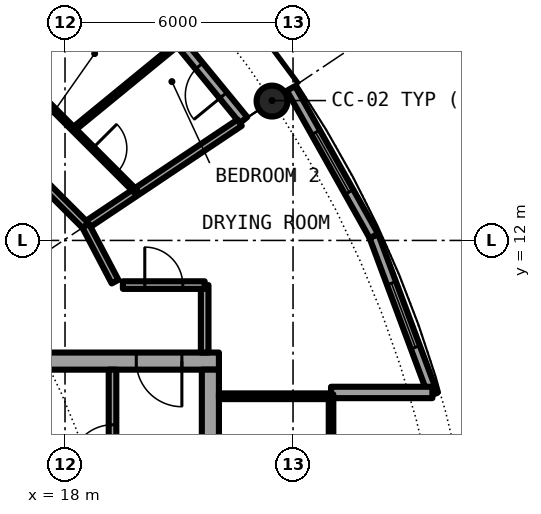
"""IFC4 building model, lengths in metres.
Left out: names, types, materials, properties, quantities, classifications, styles, units other than length and angle.
Written with IfcOpenShell. Run it as: python <this file> out.ifc"""

import sys

from ifc_helpers import new_model, si_unit, direction, frame, frame_2d, origin, origin_2d, place, context, subcontext, project, spatial, rectangle, hollow_circle, extrude, element, fill, save


model = new_model("IFC4")
c1 = context("Model", 3, precision=1e-05, world=origin(), true_north=direction((0.0, 1.0)))
c2 = subcontext(c1, "Body", "Model", "MODEL_VIEW")
j1 = project(units=[si_unit("LENGTHUNIT", "METRE"), si_unit("PLANEANGLEUNIT", "RADIAN")], contexts=[c1])
p1 = place(None, origin())
s1 = spatial("IfcSite", under=j1, at=p1, CompositionType="ELEMENT")
p2 = place(p1, origin())
s2 = spatial("IfcBuilding", under=s1, at=p2, CompositionType="ELEMENT")
p3 = place(p2, frame((0.0, 0.0, 218.8)))
s3 = spatial("IfcBuildingStorey", under=s2, at=p3, CompositionType="ELEMENT", Elevation=218.8)
p4 = place(p3, frame((23.448, 15.667, 0.0), z_axis=(0.0, 0.0, 1.0), x_axis=(1.0, 0.0, 0.0)))
e1 = element("IfcColumn", 1, at=p4, inside=s3, PredefinedType="COLUMN", context=c2, shape_type="SweptSolid", body=[
    extrude(hollow_circle(Radius=0.406, WallThickness=0.03, at=origin_2d()), origin(), (0.0, 0.0, 1.0), 3.05),
])
p5 = place(p3, frame((22.699, 15.167, 0.0), z_axis=(0.0, 0.0, 1.0), x_axis=(-0.634382322723, 0.773019449054, 0.0)))
e2 = element("IfcWall", 2, at=p5, inside=s3, PredefinedType="SOLIDWALL", context=c2, shape_type="SweptSolid", body=[
    extrude(rectangle(XDim=5.352, YDim=0.25, at=frame_2d((2.676, 0.0))), origin(), (0.0, 0.0, 1.0), 2.65),
])
p6 = place(p5, frame((0.841, 0.0, 0.0)))
e3 = element("IfcOpeningElement", 3, at=p6, cuts=e2, PredefinedType="OPENING", context=c2, shape_type="SweptSolid", body=[
    extrude(rectangle(XDim=1.0, YDim=2.2, at=frame_2d((0.5, 1.1))), frame((0.0, 0.135, 0.0), z_axis=(0.0, -1.0, 0.0), x_axis=(1.0, 0.0, 0.0)), (0.0, 0.0, 1.0), 0.27),
])
p7 = place(p5, frame((3.111, 0.0, 0.3)))
e4 = element("IfcOpeningElement", 4, at=p7, cuts=e2, PredefinedType="OPENING", context=c2, shape_type="SweptSolid", body=[
    extrude(rectangle(XDim=1.8, YDim=2.1, at=frame_2d((0.9, 1.05))), frame((0.0, 0.135, 0.0), z_axis=(0.0, -1.0, 0.0), x_axis=(1.0, 0.0, 0.0)), (0.0, 0.0, 1.0), 0.27),
])
p8 = place(p3, frame((27.682, 7.945, 0.0), z_axis=(0.0, 0.0, 1.0), x_axis=(-0.349247811493, 0.937030397675, 0.0)))
e5 = element("IfcWall", 5, at=p8, inside=s3, PredefinedType="SOLIDWALL", context=c2, shape_type="SweptSolid", body=[
    extrude(rectangle(XDim=4.452, YDim=0.25, at=frame_2d((2.226, 0.0))), origin(), (0.0, 0.0, 1.0), 2.65),
])
p9 = place(p8, frame((1.327, 0.0, 0.3)))
e6 = element("IfcOpeningElement", 6, at=p9, cuts=e5, PredefinedType="OPENING", context=c2, shape_type="SweptSolid", body=[
    extrude(rectangle(XDim=1.8, YDim=2.1, at=frame_2d((0.9, 1.05))), frame((0.0, 0.135, 0.0), z_axis=(0.0, -1.0, 0.0), x_axis=(1.0, 0.0, 0.0)), (0.0, 0.0, 1.0), 0.27),
])
p10 = place(p3, frame((26.127, 12.117, 0.0), z_axis=(0.0, 0.0, 1.0), x_axis=(-0.489696356642, 0.871893042919, 0.0)))
e7 = element("IfcWall", 7, at=p10, inside=s3, PredefinedType="SOLIDWALL", context=c2, shape_type="SweptSolid", body=[
    extrude(rectangle(XDim=4.454, YDim=0.25, at=frame_2d((2.227, 0.0))), origin(), (0.0, 0.0, 1.0), 2.65),
])
p11 = place(p10, frame((1.327, 0.0, 0.3)))
e8 = element("IfcOpeningElement", 8, at=p11, cuts=e7, PredefinedType="OPENING", context=c2, shape_type="SweptSolid", body=[
    extrude(rectangle(XDim=1.8, YDim=2.1, at=frame_2d((0.9, 1.05))), frame((0.0, 0.135, 0.0), z_axis=(0.0, -1.0, 0.0), x_axis=(1.0, 0.0, 0.0)), (0.0, 0.0, 1.0), 0.27),
])
p12 = place(p3, frame((25.0, 8.0, 0.0), z_axis=(0.0, 0.0, 1.0), x_axis=(1.0, 0.0, 0.0)))
e9 = element("IfcWall", 9, at=p12, inside=s3, PredefinedType="SOLIDWALL", context=c2, shape_type="SweptSolid", body=[
    extrude(rectangle(XDim=2.667, YDim=0.3, at=frame_2d((1.333, 0.0))), origin(), (0.0, 0.0, 1.0), 2.65),
])
p13 = place(p3, frame((22.05, 8.825, 0.0), z_axis=(0.0, 0.0, 1.0), x_axis=(-1.0, 0.0, 0.0)))
e10 = element("IfcWall", 10, at=p13, inside=s3, PredefinedType="SHEAR", context=c2, shape_type="SweptSolid", body=[
    extrude(rectangle(XDim=13.5, YDim=0.45, at=frame_2d((6.75, 0.0))), origin(), (0.0, 0.0, 1.0), 3.05),
])
p14 = place(p13, frame((0.975, 0.0, 0.0)))
e11 = element("IfcOpeningElement", 11, at=p14, cuts=e10, PredefinedType="OPENING", context=c2, shape_type="SweptSolid", body=[
    extrude(rectangle(XDim=1.2, YDim=2.3, at=frame_2d((0.6, 1.15))), frame((0.0, 0.235, 0.0), z_axis=(0.0, -1.0, 0.0), x_axis=(1.0, 0.0, 0.0)), (0.0, 0.0, 1.0), 0.47),
])
p15 = place(p3, frame((21.825, 8.6, 0.0), z_axis=(0.0, 0.0, 1.0), x_axis=(0.0, -1.0, 0.0)))
e12 = element("IfcWall", 12, at=p15, inside=s3, PredefinedType="SHEAR", context=c2, shape_type="SweptSolid", body=[
    extrude(rectangle(XDim=17.2, YDim=0.45, at=frame_2d((8.6, 0.0))), origin(), (0.0, 0.0, 1.0), 3.05),
])
p16 = place(p15, frame((7.7, 0.0, 0.0)))
e13 = element("IfcOpeningElement", 13, at=p16, cuts=e12, PredefinedType="OPENING", context=c2, shape_type="SweptSolid", body=[
    extrude(rectangle(XDim=1.8, YDim=2.3, at=frame_2d((0.9, 1.15))), frame((0.0, 0.235, 0.0), z_axis=(0.0, -1.0, 0.0), x_axis=(1.0, 0.0, 0.0)), (0.0, 0.0, 1.0), 0.47),
])
p17 = place(p3, frame((19.25, 1.575, 0.0), z_axis=(0.0, 0.0, 1.0), x_axis=(0.0, 1.0, 0.0)))
e14 = element("IfcWall", 14, at=p17, inside=s3, PredefinedType="SOLIDWALL", context=c2, shape_type="SweptSolid", body=[
    extrude(rectangle(XDim=7.025, YDim=0.2, at=frame_2d((3.513, 0.0))), origin(), (0.0, 0.0, 1.0), 2.65),
])
p18 = place(p17, frame((4.475, 0.0, 0.0)))
e15 = element("IfcOpeningElement", 15, at=p18, cuts=e14, PredefinedType="OPENING", context=c2, shape_type="SweptSolid", body=[
    extrude(rectangle(XDim=1.1, YDim=2.3, at=frame_2d((0.55, 1.15))), frame((0.0, 0.11, 0.0), z_axis=(0.0, -1.0, 0.0), x_axis=(1.0, 0.0, 0.0)), (0.0, 0.0, 1.0), 0.22),
])
p19 = place(p3, frame((22.05, 7.9, 0.0), z_axis=(0.0, 0.0, 1.0), x_axis=(1.0, 0.0, 0.0)))
e16 = element("IfcWall", 16, at=p19, inside=s3, PredefinedType="PARTITIONING", context=c2, shape_type="SweptSolid", body=[
    extrude(rectangle(XDim=2.89, YDim=0.15, at=frame_2d((1.445, 0.0))), origin(), (0.0, 0.0, 1.0), 2.65),
])
p20 = place(p3, frame((25.0, -7.95, 0.0), z_axis=(0.0, 0.0, 1.0), x_axis=(0.0, 1.0, 0.0)))
e17 = element("IfcWall", 17, at=p20, inside=s3, PredefinedType="PARTITIONING", context=c2, shape_type="SweptSolid", body=[
    extrude(rectangle(XDim=15.9, YDim=0.12, at=frame_2d((7.95, 0.0))), origin(), (0.0, 0.0, 1.0), 2.65),
])
p21 = place(p20, frame((0.95, 0.0, 0.1)))
e18 = element("IfcOpeningElement", 18, at=p21, cuts=e17, PredefinedType="OPENING", context=c2, shape_type="SweptSolid", body=[
    extrude(rectangle(XDim=14.0, YDim=1.85, at=frame_2d((7.0, 0.925))), frame((0.0, 0.07, 0.0), z_axis=(0.0, -1.0, 0.0), x_axis=(1.0, 0.0, 0.0)), (0.0, 0.0, 1.0), 0.14),
])
p22 = place(p3, frame((21.675, 9.05, 0.0), z_axis=(0.0, 0.0, 1.0), x_axis=(0.0, 1.0, 0.0)))
e19 = element("IfcWall", 19, at=p22, inside=s3, PredefinedType="PARTITIONING", context=c2, shape_type="SweptSolid", body=[
    extrude(rectangle(XDim=1.775, YDim=0.2, at=frame_2d((0.887, 0.0))), origin(), (0.0, 0.0, 1.0), 2.65),
])
p23 = place(p3, frame((16.575, 16.575, 0.0), z_axis=(0.0, 0.0, 1.0), x_axis=(0.707106781187, 0.707106781187, 0.0)))
e20 = element("IfcWall", 20, at=p23, inside=s3, PredefinedType="PARTITIONING", context=c2, shape_type="SweptSolid", body=[
    extrude(rectangle(XDim=3.735, YDim=0.1, at=frame_2d((1.868, 0.0))), origin(), (0.0, 0.0, 1.0), 2.65),
])
p24 = place(p23, frame((1.417, 0.0, 0.0)))
e21 = element("IfcOpeningElement", 21, at=p24, cuts=e20, PredefinedType="OPENING", context=c2, shape_type="SweptSolid", body=[
    extrude(rectangle(XDim=0.9, YDim=2.3, at=frame_2d((0.45, 1.15))), frame((0.0, 0.06, 0.0), z_axis=(0.0, -1.0, 0.0), x_axis=(1.0, 0.0, 0.0)), (0.0, 0.0, 1.0), 0.12),
])
p25 = place(p3, frame((18.224, 14.927, 0.0), z_axis=(0.0, 0.0, 1.0), x_axis=(0.773548271597, 0.633737383709, 0.0)))
e22 = element("IfcWall", 22, at=p25, inside=s3, PredefinedType="PARTITIONING", context=c2, shape_type="SweptSolid", body=[
    extrude(rectangle(XDim=3.618, YDim=0.1, at=frame_2d((1.809, 0.0))), origin(), (0.0, 0.0, 1.0), 2.65),
])
p26 = place(p3, frame((18.542, 12.389, 0.0), z_axis=(0.0, 0.0, 1.0), x_axis=(0.831387096605, 0.55569370664, 0.0)))
e23 = element("IfcWall", 23, at=p26, inside=s3, PredefinedType="PARTITIONING", context=c2, shape_type="SweptSolid", body=[
    extrude(rectangle(XDim=4.875, YDim=0.2, at=frame_2d((2.438, 0.0))), origin(), (0.0, 0.0, 1.0), 2.65),
])
p27 = place(p3, frame((19.523, 10.825, 0.0), z_axis=(0.0, 0.0, 1.0), x_axis=(1.0, 0.0, 0.0)))
e24 = element("IfcWall", 24, at=p27, inside=s3, PredefinedType="PARTITIONING", context=c2, shape_type="SweptSolid", body=[
    extrude(rectangle(XDim=2.152, YDim=0.2, at=frame_2d((1.076, 0.0))), origin(), (0.0, 0.0, 1.0), 2.65),
])
p28 = place(p27, frame((0.576, 0.0, 0.0)))
e25 = element("IfcOpeningElement", 25, at=p28, cuts=e24, PredefinedType="OPENING", context=c2, shape_type="SweptSolid", body=[
    extrude(rectangle(XDim=1.0, YDim=2.3, at=frame_2d((0.5, 1.15))), frame((0.0, 0.11, 0.0), z_axis=(0.0, -1.0, 0.0), x_axis=(1.0, 0.0, 0.0)), (0.0, 0.0, 1.0), 0.22),
])
p29 = place(p3, frame((12.389, 18.542, 0.0), z_axis=(0.0, 0.0, 1.0), x_axis=(0.707106781187, -0.707106781187, 0.0)))
e26 = element("IfcWall", 26, at=p29, inside=s3, PredefinedType="PARTITIONING", context=c2, shape_type="SweptSolid", body=[
    extrude(rectangle(XDim=8.702, YDim=0.2, at=frame_2d((4.351, 0.0))), origin(), (0.0, 0.0, 1.0), 2.65),
])
p30 = place(p29, frame((4.938, 0.0, 0.0)))
e27 = element("IfcOpeningElement", 27, at=p30, cuts=e26, PredefinedType="OPENING", context=c2, shape_type="SweptSolid", body=[
    extrude(rectangle(XDim=1.0, YDim=2.3, at=frame_2d((0.5, 1.15))), frame((0.0, 0.11, 0.0), z_axis=(0.0, -1.0, 0.0), x_axis=(1.0, 0.0, 0.0)), (0.0, 0.0, 1.0), 0.22),
])
p31 = place(p3, frame((18.542, 12.389, 0.0), z_axis=(0.0, 0.0, 1.0), x_axis=(0.465359652486, -0.885121683068, 0.0)))
e28 = element("IfcWall", 28, at=p31, inside=s3, PredefinedType="PARTITIONING", context=c2, shape_type="SweptSolid", body=[
    extrude(rectangle(XDim=1.665, YDim=0.2, at=frame_2d((0.833, 0.0))), origin(), (0.0, 0.0, 1.0), 2.65),
])
p32 = place(p3, frame((16.575, 16.575, 0.0), z_axis=(0.0, 0.0, 1.0), x_axis=(0.707132961115, -0.707080600289, 0.0)))
e29 = element("IfcWall", 29, at=p32, inside=s3, PredefinedType="PARTITIONING", context=c2, shape_type="SweptSolid", body=[
    extrude(rectangle(XDim=4.663, YDim=0.1, at=frame_2d((2.331, 0.0))), origin(), (0.0, 0.0, 1.0), 2.65),
])
p33 = place(p32, frame((3.043, 0.0, 0.0)))
e30 = element("IfcOpeningElement", 30, at=p33, cuts=e29, PredefinedType="OPENING", context=c2, shape_type="SweptSolid", body=[
    extrude(rectangle(XDim=0.9, YDim=2.3, at=frame_2d((0.45, 1.15))), frame((0.0, 0.06, 0.0), z_axis=(0.0, -1.0, 0.0), x_axis=(1.0, 0.0, 0.0)), (0.0, 0.0, 1.0), 0.12),
])
p34 = place(p6, origin())
e31 = element("IfcDoor", 31, at=p34, inside=s3, OperationType="SINGLE_SWING_LEFT", PredefinedType="DOOR", context=c2, shape_type="SweptSolid", body=[
    extrude(rectangle(XDim=1.0, YDim=2.2, at=frame_2d((0.5, 1.1))), frame((0.0, 0.025, 0.0), z_axis=(0.0, -1.0, 0.0), x_axis=(1.0, 0.0, 0.0)), (0.0, 0.0, 1.0), 0.05),
])
fill(e3, e31)
p35 = place(p9, origin())
e32 = element("IfcWindow", 32, at=p35, inside=s3, PartitioningType="SINGLE_PANEL", PredefinedType="WINDOW", context=c2, shape_type="SweptSolid", body=[
    extrude(rectangle(XDim=1.8, YDim=2.1, at=frame_2d((0.9, 1.05))), frame((0.0, 0.03, 0.0), z_axis=(0.0, -1.0, 0.0), x_axis=(1.0, 0.0, 0.0)), (0.0, 0.0, 1.0), 0.06),
])
fill(e6, e32)
p36 = place(p11, origin())
e33 = element("IfcWindow", 33, at=p36, inside=s3, PartitioningType="SINGLE_PANEL", PredefinedType="WINDOW", context=c2, shape_type="SweptSolid", body=[
    extrude(rectangle(XDim=1.8, YDim=2.1, at=frame_2d((0.9, 1.05))), frame((0.0, 0.03, 0.0), z_axis=(0.0, -1.0, 0.0), x_axis=(1.0, 0.0, 0.0)), (0.0, 0.0, 1.0), 0.06),
])
fill(e8, e33)
p37 = place(p18, origin())
e34 = element("IfcDoor", 34, at=p37, inside=s3, OperationType="SINGLE_SWING_LEFT", PredefinedType="DOOR", context=c2, shape_type="SweptSolid", body=[
    extrude(rectangle(XDim=1.1, YDim=2.3, at=frame_2d((0.55, 1.15))), frame((0.0, 0.025, 0.0), z_axis=(0.0, -1.0, 0.0), x_axis=(1.0, 0.0, 0.0)), (0.0, 0.0, 1.0), 0.05),
])
fill(e15, e34)
p38 = place(p14, origin())
e35 = element("IfcDoor", 35, at=p38, inside=s3, OperationType="SINGLE_SWING_RIGHT", PredefinedType="DOOR", context=c2, shape_type="SweptSolid", body=[
    extrude(rectangle(XDim=1.2, YDim=2.3, at=frame_2d((0.6, 1.15))), frame((0.0, 0.025, 0.0), z_axis=(0.0, -1.0, 0.0), x_axis=(1.0, 0.0, 0.0)), (0.0, 0.0, 1.0), 0.05),
])
fill(e11, e35)
p39 = place(p21, origin())
e36 = element("IfcWindow", 36, at=p39, inside=s3, PartitioningType="SINGLE_PANEL", PredefinedType="WINDOW", context=c2, shape_type="SweptSolid", body=[
    extrude(rectangle(XDim=14.0, YDim=1.85, at=frame_2d((7.0, 0.925))), frame((0.0, 0.03, 0.0), z_axis=(0.0, -1.0, 0.0), x_axis=(1.0, 0.0, 0.0)), (0.0, 0.0, 1.0), 0.06),
])
fill(e18, e36)
p40 = place(p33, origin())
e37 = element("IfcDoor", 37, at=p40, inside=s3, OperationType="SINGLE_SWING_RIGHT", PredefinedType="DOOR", context=c2, shape_type="SweptSolid", body=[
    extrude(rectangle(XDim=0.9, YDim=2.3, at=frame_2d((0.45, 1.15))), frame((0.0, 0.025, 0.0), z_axis=(0.0, -1.0, 0.0), x_axis=(1.0, 0.0, 0.0)), (0.0, 0.0, 1.0), 0.05),
])
fill(e30, e37)
p41 = place(p28, origin())
e38 = element("IfcDoor", 38, at=p41, inside=s3, OperationType="SINGLE_SWING_LEFT", PredefinedType="DOOR", context=c2, shape_type="SweptSolid", body=[
    extrude(rectangle(XDim=1.0, YDim=2.3, at=frame_2d((0.5, 1.15))), frame((0.0, 0.025, 0.0), z_axis=(0.0, -1.0, 0.0), x_axis=(1.0, 0.0, 0.0)), (0.0, 0.0, 1.0), 0.05),
])
fill(e25, e38)
save(model, sys.argv[1])
